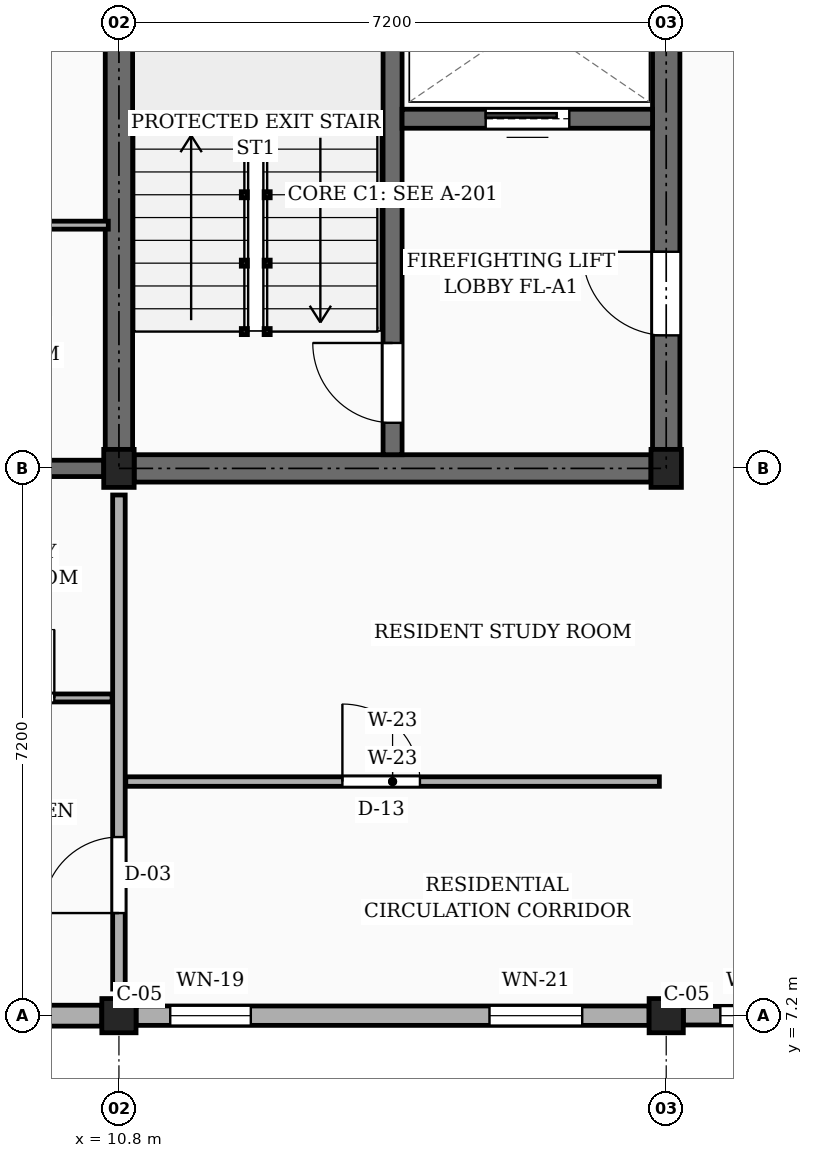
"""IFC4 building model, lengths in metres.
Left out: names, types, materials, properties, quantities, classifications, styles, units other than length and angle.
Written with IfcOpenShell. Run it as: python <this file> out.ifc"""

import sys

from ifc_helpers import new_model, si_unit, direction, frame, frame_2d, origin, origin_2d, place, context, subcontext, project, spatial, rectangle, extrude, element, fill, save


model = new_model("IFC4")
c1 = context("Model", 3, precision=1e-05, world=origin(), true_north=direction((0.0, 1.0)))
c2 = subcontext(c1, "Body", "Model", "MODEL_VIEW")
j1 = project(units=[si_unit("LENGTHUNIT", "METRE"), si_unit("PLANEANGLEUNIT", "RADIAN")], contexts=[c1])
p1 = place(None, origin())
s1 = spatial("IfcSite", under=j1, at=p1, CompositionType="ELEMENT")
p2 = place(p1, origin())
s2 = spatial("IfcBuilding", under=s1, at=p2, CompositionType="ELEMENT")
p3 = place(p2, frame((0.0, 0.0, 36.0)))
s3 = spatial("IfcBuildingStorey", under=s2, at=p3, CompositionType="ELEMENT", Elevation=36.0)
p4 = place(p3, frame((10.8, 7.2, 0.0), z_axis=(0.0, 0.0, 1.0), x_axis=(1.0, 0.0, 0.0)))
e1 = element("IfcColumn", 1, at=p4, inside=s3, PredefinedType="COLUMN", context=c2, shape_type="SweptSolid", body=[
    extrude(rectangle(XDim=0.45, YDim=0.45, at=origin_2d()), origin(), (0.0, 0.0, 1.0), 3.15),
])
p5 = place(p3, frame((10.8, 14.4, 0.0), z_axis=(0.0, 0.0, 1.0), x_axis=(1.0, 0.0, 0.0)))
e2 = element("IfcColumn", 2, at=p5, inside=s3, PredefinedType="COLUMN", context=c2, shape_type="SweptSolid", body=[
    extrude(rectangle(XDim=0.4, YDim=0.5, at=origin_2d()), origin(), (0.0, 0.0, 1.0), 3.15),
])
p6 = place(p3, frame((18.0, 7.2, 0.0), z_axis=(0.0, 0.0, 1.0), x_axis=(1.0, 0.0, 0.0)))
e3 = element("IfcColumn", 3, at=p6, inside=s3, PredefinedType="COLUMN", context=c2, shape_type="SweptSolid", body=[
    extrude(rectangle(XDim=0.45, YDim=0.45, at=origin_2d()), origin(), (0.0, 0.0, 1.0), 3.15),
])
p7 = place(p3, frame((18.0, 14.4, 0.0), z_axis=(0.0, 0.0, 1.0), x_axis=(1.0, 0.0, 0.0)))
e4 = element("IfcColumn", 4, at=p7, inside=s3, PredefinedType="COLUMN", context=c2, shape_type="SweptSolid", body=[
    extrude(rectangle(XDim=0.4, YDim=0.5, at=origin_2d()), origin(), (0.0, 0.0, 1.0), 3.15),
])
p8 = place(p3, frame((3.825, 14.4, 0.0), z_axis=(0.0, 0.0, 1.0), x_axis=(1.0, 0.0, 0.0)))
e5 = element("IfcWall", 5, at=p8, inside=s3, PredefinedType="SOLIDWALL", context=c2, shape_type="SweptSolid", body=[
    extrude(rectangle(XDim=6.775, YDim=0.215, at=frame_2d((3.388, 0.0))), origin(), (0.0, 0.0, 1.0), 2.17),
])
p9 = place(p8, frame((1.35, 0.0, 0.0)))
e6 = element("IfcOpeningElement", 6, at=p9, cuts=e5, PredefinedType="OPENING", context=c2, shape_type="SweptSolid", body=[
    extrude(rectangle(XDim=0.98, YDim=2.12, at=frame_2d((0.49, 1.06))), frame((0.0, 0.118, 0.0), z_axis=(0.0, -1.0, 0.0), x_axis=(1.0, 0.0, 0.0)), (0.0, 0.0, 1.0), 0.235),
])
p10 = place(p3, frame((3.825, 7.2, 0.0), z_axis=(0.0, 0.0, 1.0), x_axis=(1.0, 0.0, 0.0)))
e7 = element("IfcWall", 7, at=p10, inside=s3, PredefinedType="SOLIDWALL", context=c2, shape_type="SweptSolid", body=[
    extrude(rectangle(XDim=6.75, YDim=0.275, at=frame_2d((3.375, 0.0))), origin(), (0.0, 0.0, 1.0), 2.44),
])
p11 = place(p10, frame((0.45, 0.0, 0.78)))
e8 = element("IfcOpeningElement", 8, at=p11, cuts=e7, PredefinedType="OPENING", context=c2, shape_type="SweptSolid", body=[
    extrude(rectangle(XDim=0.9, YDim=1.36, at=frame_2d((0.45, 0.68))), frame((0.0, 0.147, 0.0), z_axis=(0.0, -1.0, 0.0), x_axis=(1.0, 0.0, 0.0)), (0.0, 0.0, 1.0), 0.295),
])
p12 = place(p10, frame((4.65, 0.0, 0.78)))
e9 = element("IfcOpeningElement", 9, at=p12, cuts=e7, PredefinedType="OPENING", context=c2, shape_type="SweptSolid", body=[
    extrude(rectangle(XDim=1.06, YDim=1.36, at=frame_2d((0.53, 0.68))), frame((0.0, 0.147, 0.0), z_axis=(0.0, -1.0, 0.0), x_axis=(1.0, 0.0, 0.0)), (0.0, 0.0, 1.0), 0.295),
])
p13 = place(p3, frame((11.025, 7.2, 0.0), z_axis=(0.0, 0.0, 1.0), x_axis=(1.0, 0.0, 0.0)))
e10 = element("IfcWall", 10, at=p13, inside=s3, PredefinedType="SOLIDWALL", context=c2, shape_type="SweptSolid", body=[
    extrude(rectangle(XDim=6.75, YDim=0.255, at=frame_2d((3.375, 0.0))), origin(), (0.0, 0.0, 1.0), 2.44),
])
p14 = place(p13, frame((0.45, 0.0, 0.78)))
e11 = element("IfcOpeningElement", 11, at=p14, cuts=e10, PredefinedType="OPENING", context=c2, shape_type="SweptSolid", body=[
    extrude(rectangle(XDim=1.06, YDim=1.36, at=frame_2d((0.53, 0.68))), frame((0.0, 0.137, 0.0), z_axis=(0.0, -1.0, 0.0), x_axis=(1.0, 0.0, 0.0)), (0.0, 0.0, 1.0), 0.275),
])
p15 = place(p13, frame((4.65, 0.0, 0.78)))
e12 = element("IfcOpeningElement", 12, at=p15, cuts=e10, PredefinedType="OPENING", context=c2, shape_type="SweptSolid", body=[
    extrude(rectangle(XDim=1.22, YDim=1.36, at=frame_2d((0.61, 0.68))), frame((0.0, 0.137, 0.0), z_axis=(0.0, -1.0, 0.0), x_axis=(1.0, 0.0, 0.0)), (0.0, 0.0, 1.0), 0.275),
])
p16 = place(p3, frame((18.225, 7.2, 0.0), z_axis=(0.0, 0.0, 1.0), x_axis=(1.0, 0.0, 0.0)))
e13 = element("IfcWall", 13, at=p16, inside=s3, PredefinedType="SOLIDWALL", context=c2, shape_type="SweptSolid", body=[
    extrude(rectangle(XDim=6.75, YDim=0.245, at=frame_2d((3.375, 0.0))), origin(), (0.0, 0.0, 1.0), 2.44),
])
p17 = place(p16, frame((0.488, 0.0, 0.78)))
e14 = element("IfcOpeningElement", 14, at=p17, cuts=e13, PredefinedType="OPENING", context=c2, shape_type="SweptSolid", body=[
    extrude(rectangle(XDim=1.04, YDim=1.26, at=frame_2d((0.52, 0.63))), frame((0.0, 0.133, 0.0), z_axis=(0.0, -1.0, 0.0), x_axis=(1.0, 0.0, 0.0)), (0.0, 0.0, 1.0), 0.265),
])
p18 = place(p16, frame((2.205, 0.0, 0.78)))
e15 = element("IfcOpeningElement", 15, at=p18, cuts=e13, PredefinedType="OPENING", context=c2, shape_type="SweptSolid", body=[
    extrude(rectangle(XDim=1.2, YDim=1.26, at=frame_2d((0.6, 0.63))), frame((0.0, 0.133, 0.0), z_axis=(0.0, -1.0, 0.0), x_axis=(1.0, 0.0, 0.0)), (0.0, 0.0, 1.0), 0.265),
])
p19 = place(p16, frame((4.702, 0.0, 0.78)))
e16 = element("IfcOpeningElement", 16, at=p19, cuts=e13, PredefinedType="OPENING", context=c2, shape_type="SweptSolid", body=[
    extrude(rectangle(XDim=0.94, YDim=1.44, at=frame_2d((0.47, 0.72))), frame((0.0, 0.133, 0.0), z_axis=(0.0, -1.0, 0.0), x_axis=(1.0, 0.0, 0.0)), (0.0, 0.0, 1.0), 0.265),
])
p20 = place(p3, frame((10.8, 14.65, 0.0), z_axis=(0.0, 0.0, 1.0), x_axis=(0.0, 1.0, 0.0)))
e17 = element("IfcWall", 17, at=p20, inside=s3, PredefinedType="SHEAR", context=c2, shape_type="SweptSolid", body=[
    extrude(rectangle(XDim=6.7, YDim=0.36, at=frame_2d((3.35, 0.0))), origin(), (0.0, 0.0, 1.0), 2.87),
])
p21 = place(p3, frame((18.0, 14.65, 0.0), z_axis=(0.0, 0.0, 1.0), x_axis=(0.0, 1.0, 0.0)))
e18 = element("IfcWall", 18, at=p21, inside=s3, PredefinedType="SHEAR", context=c2, shape_type="SweptSolid", body=[
    extrude(rectangle(XDim=6.7, YDim=0.36, at=frame_2d((3.35, 0.0))), origin(), (0.0, 0.0, 1.0), 2.87),
])
p22 = place(p21, frame((1.5, 0.0, 0.0)))
e19 = element("IfcOpeningElement", 19, at=p22, cuts=e18, PredefinedType="OPENING", context=c2, shape_type="SweptSolid", body=[
    extrude(rectangle(XDim=1.1, YDim=2.15, at=frame_2d((0.55, 1.075))), frame((0.0, 0.19, 0.0), z_axis=(0.0, -1.0, 0.0), x_axis=(1.0, 0.0, 0.0)), (0.0, 0.0, 1.0), 0.38),
])
p23 = place(p3, frame((11.0, 14.4, 0.0), z_axis=(0.0, 0.0, 1.0), x_axis=(1.0, 0.0, 0.0)))
e20 = element("IfcWall", 20, at=p23, inside=s3, PredefinedType="SHEAR", context=c2, shape_type="SweptSolid", body=[
    extrude(rectangle(XDim=6.8, YDim=0.36, at=frame_2d((3.4, 0.0))), origin(), (0.0, 0.0, 1.0), 2.87),
])
p24 = place(p3, frame((14.4, 14.58, 0.0), z_axis=(0.0, 0.0, 1.0), x_axis=(0.0, 1.0, 0.0)))
e21 = element("IfcWall", 21, at=p24, inside=s3, PredefinedType="SHEAR", context=c2, shape_type="SweptSolid", body=[
    extrude(rectangle(XDim=6.84, YDim=0.25, at=frame_2d((3.42, 0.0))), origin(), (0.0, 0.0, 1.0), 2.87),
])
p25 = place(p24, frame((0.42, 0.0, 0.0)))
e22 = element("IfcOpeningElement", 22, at=p25, cuts=e21, PredefinedType="OPENING", context=c2, shape_type="SweptSolid", body=[
    extrude(rectangle(XDim=1.05, YDim=2.15, at=frame_2d((0.525, 1.075))), frame((0.0, 0.135, 0.0), z_axis=(0.0, -1.0, 0.0), x_axis=(1.0, 0.0, 0.0)), (0.0, 0.0, 1.0), 0.27),
])
p26 = place(p3, frame((14.525, 19.0, 0.0), z_axis=(0.0, 0.0, 1.0), x_axis=(1.0, 0.0, 0.0)))
e23 = element("IfcWall", 23, at=p26, inside=s3, PredefinedType="SHEAR", context=c2, shape_type="SweptSolid", body=[
    extrude(rectangle(XDim=3.295, YDim=0.25, at=frame_2d((1.647, 0.0))), origin(), (0.0, 0.0, 1.0), 2.87),
])
p27 = place(p26, frame((1.1, 0.0, 0.0)))
e24 = element("IfcOpeningElement", 24, at=p27, cuts=e23, PredefinedType="OPENING", context=c2, shape_type="SweptSolid", body=[
    extrude(rectangle(XDim=1.1, YDim=2.2, at=frame_2d((0.55, 1.1))), frame((0.0, 0.135, 0.0), z_axis=(0.0, -1.0, 0.0), x_axis=(1.0, 0.0, 0.0)), (0.0, 0.0, 1.0), 0.27),
])
p28 = place(p3, frame((10.8, 7.55, 0.0), z_axis=(0.0, 0.0, 1.0), x_axis=(0.0, 1.0, 0.0)))
e25 = element("IfcWall", 25, at=p28, inside=s3, PredefinedType="PARTITIONING", context=c2, shape_type="SweptSolid", body=[
    extrude(rectangle(XDim=6.5, YDim=0.165, at=frame_2d((3.25, 0.0))), origin(), (0.0, 0.0, 1.0), 2.305),
])
p29 = place(p28, frame((1.0, 0.0, 0.0)))
e26 = element("IfcOpeningElement", 26, at=p29, cuts=e25, PredefinedType="OPENING", context=c2, shape_type="SweptSolid", body=[
    extrude(rectangle(XDim=1.0, YDim=2.15, at=frame_2d((0.5, 1.075))), frame((0.0, 0.093, 0.0), z_axis=(0.0, -1.0, 0.0), x_axis=(1.0, 0.0, 0.0)), (0.0, 0.0, 1.0), 0.185),
])
p30 = place(p3, frame((10.89, 10.28, 0.0), z_axis=(0.0, 0.0, 1.0), x_axis=(1.0, 0.0, 0.0)))
e27 = element("IfcWall", 27, at=p30, inside=s3, PredefinedType="PARTITIONING", context=c2, shape_type="SweptSolid", body=[
    extrude(rectangle(XDim=7.02, YDim=0.125, at=frame_2d((3.51, 0.0))), origin(), (0.0, 0.0, 1.0), 2.305),
])
p31 = place(p30, frame((2.85, 0.0, 0.0)))
e28 = element("IfcOpeningElement", 28, at=p31, cuts=e27, PredefinedType="OPENING", context=c2, shape_type="SweptSolid", body=[
    extrude(rectangle(XDim=1.02, YDim=2.15, at=frame_2d((0.51, 1.075))), frame((0.0, 0.073, 0.0), z_axis=(0.0, -1.0, 0.0), x_axis=(1.0, 0.0, 0.0)), (0.0, 0.0, 1.0), 0.145),
])
p32 = place(p3, frame((8.29, 11.38, 0.0), z_axis=(0.0, 0.0, 1.0), x_axis=(1.0, 0.0, 0.0)))
e29 = element("IfcWall", 29, at=p32, inside=s3, PredefinedType="PARTITIONING", context=c2, shape_type="SweptSolid", body=[
    extrude(rectangle(XDim=2.42, YDim=0.105, at=frame_2d((1.21, 0.0))), origin(), (0.0, 0.0, 1.0), 2.305),
])
p33 = place(p32, frame((0.76, 0.0, 0.0)))
e30 = element("IfcOpeningElement", 30, at=p33, cuts=e29, PredefinedType="OPENING", context=c2, shape_type="SweptSolid", body=[
    extrude(rectangle(XDim=0.9, YDim=2.05, at=frame_2d((0.45, 1.025))), frame((0.0, 0.062, 0.0), z_axis=(0.0, -1.0, 0.0), x_axis=(1.0, 0.0, 0.0)), (0.0, 0.0, 1.0), 0.125),
])
p34 = place(p3, frame((7.27, 17.6, 0.0), z_axis=(0.0, 0.0, 1.0), x_axis=(1.0, 0.0, 0.0)))
e31 = element("IfcWall", 31, at=p34, inside=s3, PredefinedType="PARTITIONING", context=c2, shape_type="SweptSolid", body=[
    extrude(rectangle(XDim=3.39, YDim=0.105, at=frame_2d((1.695, 0.0))), origin(), (0.0, 0.0, 1.0), 2.305),
])
p35 = place(p14, origin())
e32 = element("IfcWindow", 32, at=p35, inside=s3, PartitioningType="SINGLE_PANEL", PredefinedType="WINDOW", context=c2, shape_type="SweptSolid", body=[
    extrude(rectangle(XDim=1.06, YDim=1.36, at=frame_2d((0.53, 0.68))), frame((0.0, 0.03, 0.0), z_axis=(0.0, -1.0, 0.0), x_axis=(1.0, 0.0, 0.0)), (0.0, 0.0, 1.0), 0.06),
])
fill(e11, e32)
p36 = place(p15, origin())
e33 = element("IfcWindow", 33, at=p36, inside=s3, PartitioningType="SINGLE_PANEL", PredefinedType="WINDOW", context=c2, shape_type="SweptSolid", body=[
    extrude(rectangle(XDim=1.22, YDim=1.36, at=frame_2d((0.61, 0.68))), frame((0.0, 0.03, 0.0), z_axis=(0.0, -1.0, 0.0), x_axis=(1.0, 0.0, 0.0)), (0.0, 0.0, 1.0), 0.06),
])
fill(e12, e33)
p37 = place(p17, origin())
e34 = element("IfcWindow", 34, at=p37, inside=s3, PartitioningType="SINGLE_PANEL", PredefinedType="WINDOW", context=c2, shape_type="SweptSolid", body=[
    extrude(rectangle(XDim=1.04, YDim=1.26, at=frame_2d((0.52, 0.63))), frame((0.0, 0.03, 0.0), z_axis=(0.0, -1.0, 0.0), x_axis=(1.0, 0.0, 0.0)), (0.0, 0.0, 1.0), 0.06),
])
fill(e14, e34)
p38 = place(p22, frame((1.1, 0.0, 0.0), z_axis=(0.0, 0.0, 1.0), x_axis=(-1.0, 0.0, 0.0)))
e35 = element("IfcDoor", 35, at=p38, inside=s3, OperationType="SINGLE_SWING_RIGHT", PredefinedType="DOOR", context=c2, shape_type="SweptSolid", body=[
    extrude(rectangle(XDim=1.1, YDim=2.15, at=frame_2d((0.55, 1.075))), frame((0.0, 0.025, 0.0), z_axis=(0.0, -1.0, 0.0), x_axis=(1.0, 0.0, 0.0)), (0.0, 0.0, 1.0), 0.05),
])
fill(e19, e35)
p39 = place(p25, origin())
e36 = element("IfcDoor", 36, at=p39, inside=s3, OperationType="SINGLE_SWING_RIGHT", PredefinedType="DOOR", context=c2, shape_type="SweptSolid", body=[
    extrude(rectangle(XDim=1.05, YDim=2.15, at=frame_2d((0.525, 1.075))), frame((0.0, 0.025, 0.0), z_axis=(0.0, -1.0, 0.0), x_axis=(1.0, 0.0, 0.0)), (0.0, 0.0, 1.0), 0.05),
])
fill(e22, e36)
p40 = place(p27, origin())
e37 = element("IfcDoor", 37, at=p40, inside=s3, OperationType="SLIDING_TO_LEFT", PredefinedType="DOOR", context=c2, shape_type="SweptSolid", body=[
    extrude(rectangle(XDim=1.1, YDim=2.2, at=frame_2d((0.55, 1.1))), frame((0.0, 0.025, 0.0), z_axis=(0.0, -1.0, 0.0), x_axis=(1.0, 0.0, 0.0)), (0.0, 0.0, 1.0), 0.05),
])
fill(e24, e37)
p41 = place(p29, origin())
e38 = element("IfcDoor", 38, at=p41, inside=s3, OperationType="SINGLE_SWING_LEFT", PredefinedType="DOOR", context=c2, shape_type="SweptSolid", body=[
    extrude(rectangle(XDim=1.0, YDim=2.15, at=frame_2d((0.5, 1.075))), frame((0.0, 0.025, 0.0), z_axis=(0.0, -1.0, 0.0), x_axis=(1.0, 0.0, 0.0)), (0.0, 0.0, 1.0), 0.05),
])
fill(e26, e38)
p42 = place(p31, origin())
e39 = element("IfcDoor", 39, at=p42, inside=s3, OperationType="SINGLE_SWING_LEFT", PredefinedType="DOOR", context=c2, shape_type="SweptSolid", body=[
    extrude(rectangle(XDim=1.02, YDim=2.15, at=frame_2d((0.51, 1.075))), frame((0.0, 0.025, 0.0), z_axis=(0.0, -1.0, 0.0), x_axis=(1.0, 0.0, 0.0)), (0.0, 0.0, 1.0), 0.05),
])
fill(e28, e39)
p43 = place(p33, origin())
e40 = element("IfcDoor", 40, at=p43, inside=s3, OperationType="SINGLE_SWING_RIGHT", PredefinedType="DOOR", context=c2, shape_type="SweptSolid", body=[
    extrude(rectangle(XDim=0.9, YDim=2.05, at=frame_2d((0.45, 1.025))), frame((0.0, 0.025, 0.0), z_axis=(0.0, -1.0, 0.0), x_axis=(1.0, 0.0, 0.0)), (0.0, 0.0, 1.0), 0.05),
])
fill(e30, e40)
save(model, sys.argv[1])
